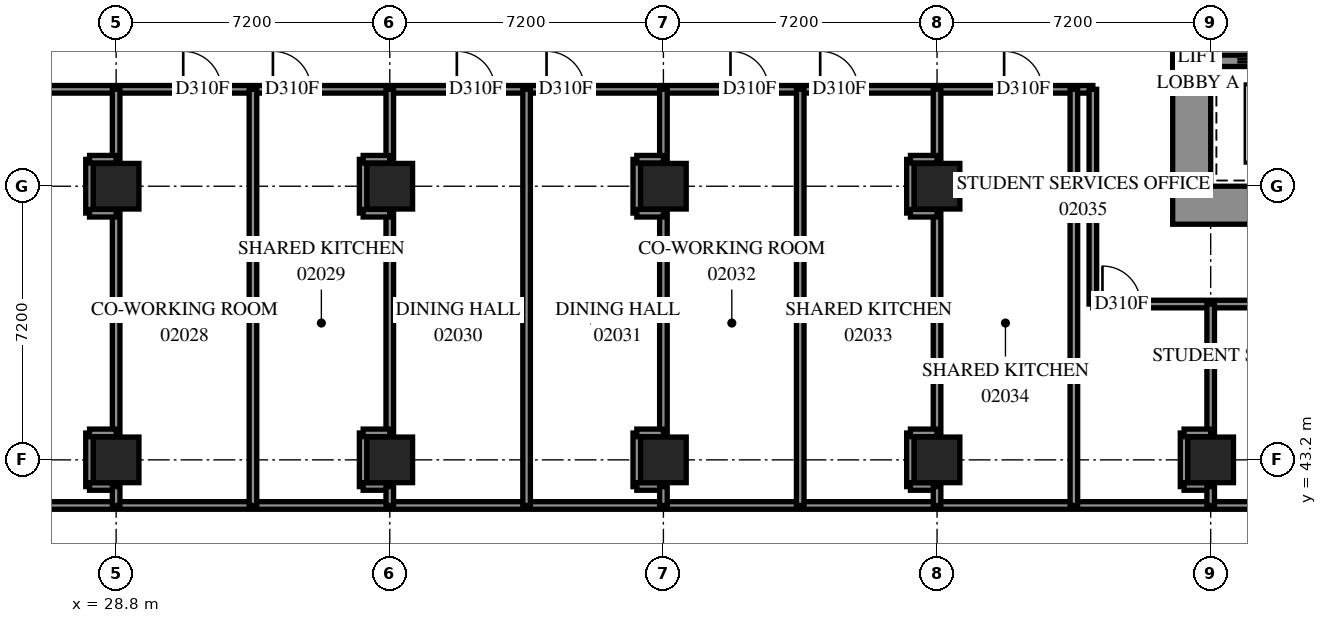
"""IFC4 building model, lengths in metres.
Left out: names, types, materials, properties, quantities, classifications, styles, units other than length and angle.
Written with IfcOpenShell. Run it as: python <this file> out.ifc"""

import sys

from ifc_helpers import new_model, si_unit, direction, frame, frame_2d, origin, origin_2d, place, context, subcontext, project, spatial, rectangle, extrude, element, fill, save


model = new_model("IFC4")
c1 = context("Model", 3, precision=1e-05, world=origin(), true_north=direction((0.0, 1.0)))
c2 = subcontext(c1, "Body", "Model", "MODEL_VIEW")
j1 = project(units=[si_unit("LENGTHUNIT", "METRE"), si_unit("PLANEANGLEUNIT", "RADIAN")], contexts=[c1])
p1 = place(None, origin())
s1 = spatial("IfcSite", under=j1, at=p1, CompositionType="ELEMENT")
p2 = place(p1, origin())
s2 = spatial("IfcBuilding", under=s1, at=p2, CompositionType="ELEMENT")
p3 = place(p2, frame((0.0, 0.0, 10.2)))
s3 = spatial("IfcBuildingStorey", under=s2, at=p3, CompositionType="ELEMENT", Elevation=10.2)
for number, where, z_axis, x_axis in (
    (1, (28.8, 43.2, 0.0), (0.0, 0.0, 1.0), (1.0, 0.0, 0.0)),
    (2, (28.8, 50.4, 0.0), (0.0, 0.0, 1.0), (1.0, 0.0, 0.0)),
    (3, (36.0, 43.2, 0.0), (0.0, 0.0, 1.0), (1.0, 0.0, 0.0)),
    (4, (36.0, 50.4, 0.0), (0.0, 0.0, 1.0), (1.0, 0.0, 0.0)),
    (5, (43.2, 43.2, 0.0), (0.0, 0.0, 1.0), (1.0, 0.0, 0.0)),
    (6, (43.2, 50.4, 0.0), (0.0, 0.0, 1.0), (1.0, 0.0, 0.0)),
    (7, (50.4, 43.2, 0.0), (0.0, 0.0, 1.0), (1.0, 0.0, 0.0)),
    (8, (50.4, 50.4, 0.0), (0.0, 0.0, 1.0), (1.0, 0.0, 0.0)),
    (9, (57.6, 43.2, 0.0), (0.0, 0.0, 1.0), (1.0, 0.0, 0.0)),
):
    element("IfcColumn", number, at=place(p3, frame(where, z_axis=z_axis, x_axis=x_axis)), inside=s3, PredefinedType="COLUMN", context=c2, shape_type="SweptSolid", body=[
        extrude(rectangle(XDim=1.2, YDim=1.2, at=origin_2d()), origin(), (0.0, 0.0, 1.0), 3.8),
    ])
p4 = place(p3, frame((56.6, 49.9, -0.4), z_axis=(0.0, 0.0, 1.0), x_axis=(1.0, 0.0, 0.0)))
e10 = element("IfcWall", 10, at=p4, inside=s3, PredefinedType="SHEAR", context=c2, shape_type="SweptSolid", body=[
    extrude(rectangle(XDim=16.4, YDim=1.0, at=frame_2d((8.2, 0.0))), origin(), (0.0, 0.0, 1.0), 3.5),
])
p5 = place(p3, frame((57.1, 50.4, -0.4), z_axis=(0.0, 0.0, 1.0), x_axis=(0.0, 1.0, 0.0)))
e11 = element("IfcWall", 11, at=p5, inside=s3, PredefinedType="SHEAR", context=c2, shape_type="SweptSolid", body=[
    extrude(rectangle(XDim=14.4, YDim=1.0, at=frame_2d((7.2, 0.0))), origin(), (0.0, 0.0, 1.0), 3.5),
])
p6 = place(p5, frame((4.55, 0.0, 0.4)))
e12 = element("IfcOpeningElement", 12, at=p6, cuts=e11, PredefinedType="OPENING", context=c2, shape_type="SweptSolid", body=[
    extrude(rectangle(XDim=1.1, YDim=2.1, at=frame_2d((0.55, 1.05))), frame((0.0, 0.51, 0.0), z_axis=(0.0, -1.0, 0.0), x_axis=(1.0, 0.0, 0.0)), (0.0, 0.0, 1.0), 1.02),
])
p7 = place(p5, frame((11.35, 0.0, 0.4)))
e13 = element("IfcOpeningElement", 13, at=p7, cuts=e11, PredefinedType="OPENING", context=c2, shape_type="SweptSolid", body=[
    extrude(rectangle(XDim=1.1, YDim=2.1, at=frame_2d((0.55, 1.05))), frame((0.0, 0.51, 0.0), z_axis=(0.0, -1.0, 0.0), x_axis=(1.0, 0.0, 0.0)), (0.0, 0.0, 1.0), 1.02),
])
p8 = place(p3, frame((57.6, 53.7, 0.0), z_axis=(0.0, 0.0, 1.0), x_axis=(1.0, 0.0, 0.0)))
e14 = element("IfcWall", 14, at=p8, inside=s3, PredefinedType="SOLIDWALL", context=c2, shape_type="SweptSolid", body=[
    extrude(rectangle(XDim=14.4, YDim=0.3, at=frame_2d((7.2, 0.0))), origin(), (0.0, 0.0, 1.0), 3.8),
])
p9 = place(p8, frame((1.25, 0.0, 0.0)))
e15 = element("IfcOpeningElement", 15, at=p9, cuts=e14, PredefinedType="OPENING", context=c2, shape_type="SweptSolid", body=[
    extrude(rectangle(XDim=1.1, YDim=2.1, at=frame_2d((0.55, 1.05))), frame((0.0, 0.16, 0.0), z_axis=(0.0, -1.0, 0.0), x_axis=(1.0, 0.0, 0.0)), (0.0, 0.0, 1.0), 0.32),
])
p10 = place(p8, frame((4.85, 0.0, 0.0)))
e16 = element("IfcOpeningElement", 16, at=p10, cuts=e14, PredefinedType="OPENING", context=c2, shape_type="SweptSolid", body=[
    extrude(rectangle(XDim=1.1, YDim=2.1, at=frame_2d((0.55, 1.05))), frame((0.0, 0.16, 0.0), z_axis=(0.0, -1.0, 0.0), x_axis=(1.0, 0.0, 0.0)), (0.0, 0.0, 1.0), 0.32),
])
p11 = place(p8, frame((8.45, 0.0, 0.0)))
e17 = element("IfcOpeningElement", 17, at=p11, cuts=e14, PredefinedType="OPENING", context=c2, shape_type="SweptSolid", body=[
    extrude(rectangle(XDim=1.1, YDim=2.1, at=frame_2d((0.55, 1.05))), frame((0.0, 0.16, 0.0), z_axis=(0.0, -1.0, 0.0), x_axis=(1.0, 0.0, 0.0)), (0.0, 0.0, 1.0), 0.32),
])
p12 = place(p8, frame((12.05, 0.0, 0.0)))
e18 = element("IfcOpeningElement", 18, at=p12, cuts=e14, PredefinedType="OPENING", context=c2, shape_type="SweptSolid", body=[
    extrude(rectangle(XDim=1.1, YDim=2.1, at=frame_2d((0.55, 1.05))), frame((0.0, 0.16, 0.0), z_axis=(0.0, -1.0, 0.0), x_axis=(1.0, 0.0, 0.0)), (0.0, 0.0, 1.0), 0.32),
])
p13 = place(p3, frame((13.75, 42.0, 0.0), z_axis=(0.0, 0.0, 1.0), x_axis=(1.0, 0.0, 0.0)))
e19 = element("IfcWall", 19, at=p13, inside=s3, PredefinedType="PARTITIONING", context=c2, shape_type="SweptSolid", body=[
    extrude(rectangle(XDim=58.9, YDim=0.2, at=frame_2d((29.45, 0.0))), origin(), (0.0, 0.0, 1.0), 3.8),
])
p14 = place(p3, frame((0.0, 52.95, 0.0), z_axis=(0.0, 0.0, 1.0), x_axis=(1.0, 0.0, 0.0)))
e20 = element("IfcWall", 20, at=p14, inside=s3, PredefinedType="PARTITIONING", context=c2, shape_type="SweptSolid", body=[
    extrude(rectangle(XDim=54.5, YDim=0.2, at=frame_2d((27.25, 0.0))), origin(), (0.0, 0.0, 1.0), 3.8),
])
p15 = place(p14, frame((8.669, 0.0, 0.0)))
e21 = element("IfcOpeningElement", 21, at=p15, cuts=e20, PredefinedType="OPENING", context=c2, shape_type="SweptSolid", body=[
    extrude(rectangle(XDim=1.0, YDim=2.1, at=frame_2d((0.5, 1.05))), frame((0.0, 0.11, 0.0), z_axis=(0.0, -1.0, 0.0), x_axis=(1.0, 0.0, 0.0)), (0.0, 0.0, 1.0), 0.22),
])
p16 = place(p14, frame((11.307, 0.0, 0.0)))
e22 = element("IfcOpeningElement", 22, at=p16, cuts=e20, PredefinedType="OPENING", context=c2, shape_type="SweptSolid", body=[
    extrude(rectangle(XDim=1.0, YDim=2.1, at=frame_2d((0.5, 1.05))), frame((0.0, 0.11, 0.0), z_axis=(0.0, -1.0, 0.0), x_axis=(1.0, 0.0, 0.0)), (0.0, 0.0, 1.0), 0.22),
])
p17 = place(p14, frame((16.433, 0.0, 0.0)))
e23 = element("IfcOpeningElement", 23, at=p17, cuts=e20, PredefinedType="OPENING", context=c2, shape_type="SweptSolid", body=[
    extrude(rectangle(XDim=1.0, YDim=2.1, at=frame_2d((0.5, 1.05))), frame((0.0, 0.11, 0.0), z_axis=(0.0, -1.0, 0.0), x_axis=(1.0, 0.0, 0.0)), (0.0, 0.0, 1.0), 0.22),
])
p18 = place(p14, frame((22.025, 0.0, 0.0)))
e24 = element("IfcOpeningElement", 24, at=p18, cuts=e20, PredefinedType="OPENING", context=c2, shape_type="SweptSolid", body=[
    extrude(rectangle(XDim=1.0, YDim=2.1, at=frame_2d((0.5, 1.05))), frame((0.0, 0.11, 0.0), z_axis=(0.0, -1.0, 0.0), x_axis=(1.0, 0.0, 0.0)), (0.0, 0.0, 1.0), 0.22),
])
p19 = place(p14, frame((30.565, 0.0, 0.0)))
e25 = element("IfcOpeningElement", 25, at=p19, cuts=e20, PredefinedType="OPENING", context=c2, shape_type="SweptSolid", body=[
    extrude(rectangle(XDim=1.0, YDim=2.1, at=frame_2d((0.5, 1.05))), frame((0.0, 0.11, 0.0), z_axis=(0.0, -1.0, 0.0), x_axis=(1.0, 0.0, 0.0)), (0.0, 0.0, 1.0), 0.22),
])
p20 = place(p14, frame((32.925, 0.0, 0.0)))
e26 = element("IfcOpeningElement", 26, at=p20, cuts=e20, PredefinedType="OPENING", context=c2, shape_type="SweptSolid", body=[
    extrude(rectangle(XDim=1.0, YDim=2.1, at=frame_2d((0.5, 1.05))), frame((0.0, 0.11, 0.0), z_axis=(0.0, -1.0, 0.0), x_axis=(1.0, 0.0, 0.0)), (0.0, 0.0, 1.0), 0.22),
])
p21 = place(p14, frame((37.765, 0.0, 0.0)))
e27 = element("IfcOpeningElement", 27, at=p21, cuts=e20, PredefinedType="OPENING", context=c2, shape_type="SweptSolid", body=[
    extrude(rectangle(XDim=1.0, YDim=2.1, at=frame_2d((0.5, 1.05))), frame((0.0, 0.11, 0.0), z_axis=(0.0, -1.0, 0.0), x_axis=(1.0, 0.0, 0.0)), (0.0, 0.0, 1.0), 0.22),
])
p22 = place(p14, frame((40.125, 0.0, 0.0)))
e28 = element("IfcOpeningElement", 28, at=p22, cuts=e20, PredefinedType="OPENING", context=c2, shape_type="SweptSolid", body=[
    extrude(rectangle(XDim=1.0, YDim=2.1, at=frame_2d((0.5, 1.05))), frame((0.0, 0.11, 0.0), z_axis=(0.0, -1.0, 0.0), x_axis=(1.0, 0.0, 0.0)), (0.0, 0.0, 1.0), 0.22),
])
p23 = place(p14, frame((44.965, 0.0, 0.0)))
e29 = element("IfcOpeningElement", 29, at=p23, cuts=e20, PredefinedType="OPENING", context=c2, shape_type="SweptSolid", body=[
    extrude(rectangle(XDim=1.0, YDim=2.1, at=frame_2d((0.5, 1.05))), frame((0.0, 0.11, 0.0), z_axis=(0.0, -1.0, 0.0), x_axis=(1.0, 0.0, 0.0)), (0.0, 0.0, 1.0), 0.22),
])
p24 = place(p14, frame((47.325, 0.0, 0.0)))
e30 = element("IfcOpeningElement", 30, at=p24, cuts=e20, PredefinedType="OPENING", context=c2, shape_type="SweptSolid", body=[
    extrude(rectangle(XDim=1.0, YDim=2.1, at=frame_2d((0.5, 1.05))), frame((0.0, 0.11, 0.0), z_axis=(0.0, -1.0, 0.0), x_axis=(1.0, 0.0, 0.0)), (0.0, 0.0, 1.0), 0.22),
])
p25 = place(p14, frame((52.165, 0.0, 0.0)))
e31 = element("IfcOpeningElement", 31, at=p25, cuts=e20, PredefinedType="OPENING", context=c2, shape_type="SweptSolid", body=[
    extrude(rectangle(XDim=1.0, YDim=2.1, at=frame_2d((0.5, 1.05))), frame((0.0, 0.11, 0.0), z_axis=(0.0, -1.0, 0.0), x_axis=(1.0, 0.0, 0.0)), (0.0, 0.0, 1.0), 0.22),
])
p26 = place(p14, frame((2.372, 0.0, 0.0)))
e32 = element("IfcOpeningElement", 32, at=p26, cuts=e20, PredefinedType="OPENING", context=c2, shape_type="SweptSolid", body=[
    extrude(rectangle(XDim=1.0, YDim=2.1, at=frame_2d((0.5, 1.05))), frame((0.0, 0.11, 0.0), z_axis=(0.0, -1.0, 0.0), x_axis=(1.0, 0.0, 0.0)), (0.0, 0.0, 1.0), 0.22),
])
p27 = place(p14, frame((4.792, 0.0, 0.0)))
e33 = element("IfcOpeningElement", 33, at=p27, cuts=e20, PredefinedType="OPENING", context=c2, shape_type="SweptSolid", body=[
    extrude(rectangle(XDim=1.0, YDim=2.1, at=frame_2d((0.5, 1.05))), frame((0.0, 0.11, 0.0), z_axis=(0.0, -1.0, 0.0), x_axis=(1.0, 0.0, 0.0)), (0.0, 0.0, 1.0), 0.22),
])
p28 = place(p3, frame((54.5, 47.3, 0.0), z_axis=(0.0, 0.0, 1.0), x_axis=(1.0, 0.0, 0.0)))
e34 = element("IfcWall", 34, at=p28, inside=s3, PredefinedType="PARTITIONING", context=c2, shape_type="SweptSolid", body=[
    extrude(rectangle(XDim=19.56, YDim=0.2, at=frame_2d((9.78, 0.0))), origin(), (0.0, 0.0, 1.0), 3.8),
])
p29 = place(p28, frame((0.252, 0.0, 0.0)))
e35 = element("IfcOpeningElement", 35, at=p29, cuts=e34, PredefinedType="OPENING", context=c2, shape_type="SweptSolid", body=[
    extrude(rectangle(XDim=1.0, YDim=2.1, at=frame_2d((0.5, 1.05))), frame((0.0, 0.11, 0.0), z_axis=(0.0, -1.0, 0.0), x_axis=(1.0, 0.0, 0.0)), (0.0, 0.0, 1.0), 0.22),
])
p30 = place(p28, frame((4.865, 0.0, 0.0)))
e36 = element("IfcOpeningElement", 36, at=p30, cuts=e34, PredefinedType="OPENING", context=c2, shape_type="SweptSolid", body=[
    extrude(rectangle(XDim=1.0, YDim=2.1, at=frame_2d((0.5, 1.05))), frame((0.0, 0.11, 0.0), z_axis=(0.0, -1.0, 0.0), x_axis=(1.0, 0.0, 0.0)), (0.0, 0.0, 1.0), 0.22),
])
p31 = place(p28, frame((7.225, 0.0, 0.0)))
e37 = element("IfcOpeningElement", 37, at=p31, cuts=e34, PredefinedType="OPENING", context=c2, shape_type="SweptSolid", body=[
    extrude(rectangle(XDim=1.0, YDim=2.1, at=frame_2d((0.5, 1.05))), frame((0.0, 0.11, 0.0), z_axis=(0.0, -1.0, 0.0), x_axis=(1.0, 0.0, 0.0)), (0.0, 0.0, 1.0), 0.22),
])
p32 = place(p28, frame((12.065, 0.0, 0.0)))
e38 = element("IfcOpeningElement", 38, at=p32, cuts=e34, PredefinedType="OPENING", context=c2, shape_type="SweptSolid", body=[
    extrude(rectangle(XDim=1.0, YDim=2.1, at=frame_2d((0.5, 1.05))), frame((0.0, 0.11, 0.0), z_axis=(0.0, -1.0, 0.0), x_axis=(1.0, 0.0, 0.0)), (0.0, 0.0, 1.0), 0.22),
])
p33 = place(p28, frame((14.425, 0.0, 0.0)))
e39 = element("IfcOpeningElement", 39, at=p33, cuts=e34, PredefinedType="OPENING", context=c2, shape_type="SweptSolid", body=[
    extrude(rectangle(XDim=1.0, YDim=2.1, at=frame_2d((0.5, 1.05))), frame((0.0, 0.11, 0.0), z_axis=(0.0, -1.0, 0.0), x_axis=(1.0, 0.0, 0.0)), (0.0, 0.0, 1.0), 0.22),
])
for number, where, z_axis, x_axis in (
    (40, (32.4, 42.0, 0.0), (0.0, 0.0, 1.0), (0.0, 1.0, 0.0)),
    (41, (39.6, 42.0, 0.0), (0.0, 0.0, 1.0), (0.0, 1.0, 0.0)),
    (42, (46.8, 42.0, 0.0), (0.0, 0.0, 1.0), (0.0, 1.0, 0.0)),
    (43, (54.0, 42.0, 0.0), (0.0, 0.0, 1.0), (0.0, 1.0, 0.0)),
):
    element("IfcWall", number, at=place(p3, frame(where, z_axis=z_axis, x_axis=x_axis)), inside=s3, PredefinedType="PARTITIONING", context=c2, shape_type="SweptSolid", body=[
        extrude(rectangle(XDim=10.95, YDim=0.2, at=frame_2d((5.475, 0.0))), origin(), (0.0, 0.0, 1.0), 3.8),
    ])
for number, where, z_axis, x_axis in (
    (44, (28.8, 43.906, 0.0), (0.0, 0.0, 1.0), (0.0, 1.0, 0.0)),
    (45, (36.0, 43.906, 0.0), (0.0, 0.0, 1.0), (0.0, 1.0, 0.0)),
    (46, (43.2, 43.906, 0.0), (0.0, 0.0, 1.0), (0.0, 1.0, 0.0)),
    (47, (50.4, 43.906, 0.0), (0.0, 0.0, 1.0), (0.0, 1.0, 0.0)),
):
    element("IfcWall", number, at=place(p3, frame(where, z_axis=z_axis, x_axis=x_axis)), inside=s3, PredefinedType="PARTITIONING", context=c2, shape_type="SweptSolid", body=[
        extrude(rectangle(XDim=5.788, YDim=0.2, at=frame_2d((2.894, 0.0))), origin(), (0.0, 0.0, 1.0), 3.8),
    ])
p34 = place(p3, frame((54.5, 47.3, 0.0), z_axis=(0.0, 0.0, 1.0), x_axis=(0.0, 1.0, 0.0)))
e48 = element("IfcWall", 48, at=p34, inside=s3, PredefinedType="PARTITIONING", context=c2, shape_type="SweptSolid", body=[
    extrude(rectangle(XDim=5.65, YDim=0.2, at=frame_2d((2.825, 0.0))), origin(), (0.0, 0.0, 1.0), 3.8),
])
p35 = place(p3, frame((57.6, 43.906, 0.0), z_axis=(0.0, 0.0, 1.0), x_axis=(0.0, 1.0, 0.0)))
e49 = element("IfcWall", 49, at=p35, inside=s3, PredefinedType="PARTITIONING", context=c2, shape_type="SweptSolid", body=[
    extrude(rectangle(XDim=3.394, YDim=0.2, at=frame_2d((1.697, 0.0))), origin(), (0.0, 0.0, 1.0), 3.8),
])
for number, where, z_axis, x_axis in (
    (50, (28.8, 51.106, 0.0), (0.0, 0.0, 1.0), (0.0, 1.0, 0.0)),
    (51, (36.0, 51.106, 0.0), (0.0, 0.0, 1.0), (0.0, 1.0, 0.0)),
    (52, (43.2, 51.106, 0.0), (0.0, 0.0, 1.0), (0.0, 1.0, 0.0)),
    (53, (50.4, 51.106, 0.0), (0.0, 0.0, 1.0), (0.0, 1.0, 0.0)),
):
    element("IfcWall", number, at=place(p3, frame(where, z_axis=z_axis, x_axis=x_axis)), inside=s3, PredefinedType="PARTITIONING", context=c2, shape_type="SweptSolid", body=[
        extrude(rectangle(XDim=1.844, YDim=0.2, at=frame_2d((0.922, 0.0))), origin(), (0.0, 0.0, 1.0), 3.8),
    ])
for number, where, z_axis, x_axis in (
    (54, (28.1, 49.694, 0.0), (0.0, 0.0, 1.0), (0.0, 1.0, 0.0)),
    (55, (35.3, 49.694, 0.0), (0.0, 0.0, 1.0), (0.0, 1.0, 0.0)),
    (56, (42.5, 49.694, 0.0), (0.0, 0.0, 1.0), (0.0, 1.0, 0.0)),
    (57, (49.7, 49.694, 0.0), (0.0, 0.0, 1.0), (0.0, 1.0, 0.0)),
):
    element("IfcWall", number, at=place(p3, frame(where, z_axis=z_axis, x_axis=x_axis)), inside=s3, PredefinedType="PARTITIONING", context=c2, shape_type="SweptSolid", body=[
        extrude(rectangle(XDim=1.412, YDim=0.2, at=frame_2d((0.706, 0.0))), origin(), (0.0, 0.0, 1.0), 3.8),
    ])
for number, where, z_axis, x_axis in (
    (58, (28.1, 42.496, 0.0), (0.0, 0.0, 1.0), (0.0, 1.0, 0.0)),
    (59, (35.3, 42.496, 0.0), (0.0, 0.0, 1.0), (0.0, 1.0, 0.0)),
    (60, (42.5, 42.496, 0.0), (0.0, 0.0, 1.0), (0.0, 1.0, 0.0)),
    (61, (49.7, 42.496, 0.0), (0.0, 0.0, 1.0), (0.0, 1.0, 0.0)),
    (62, (56.9, 42.496, 0.0), (0.0, 0.0, 1.0), (0.0, 1.0, 0.0)),
):
    element("IfcWall", number, at=place(p3, frame(where, z_axis=z_axis, x_axis=x_axis)), inside=s3, PredefinedType="PARTITIONING", context=c2, shape_type="SweptSolid", body=[
        extrude(rectangle(XDim=1.41, YDim=0.2, at=frame_2d((0.705, 0.0))), origin(), (0.0, 0.0, 1.0), 3.8),
    ])
for number, where, z_axis, x_axis in (
    (63, (35.3, 51.11, 0.0), (0.0, 0.0, 1.0), (1.0, 0.0, 0.0)),
    (64, (42.5, 51.11, 0.0), (0.0, 0.0, 1.0), (1.0, 0.0, 0.0)),
    (65, (35.3, 49.69, 0.0), (0.0, 0.0, 1.0), (1.0, 0.0, 0.0)),
    (66, (42.5, 49.69, 0.0), (0.0, 0.0, 1.0), (1.0, 0.0, 0.0)),
    (67, (35.3, 43.91, 0.0), (0.0, 0.0, 1.0), (1.0, 0.0, 0.0)),
    (68, (42.5, 43.91, 0.0), (0.0, 0.0, 1.0), (1.0, 0.0, 0.0)),
    (69, (56.9, 43.91, 0.0), (0.0, 0.0, 1.0), (1.0, 0.0, 0.0)),
    (70, (35.3, 42.5, 0.0), (0.0, 0.0, 1.0), (1.0, 0.0, 0.0)),
    (71, (42.5, 42.5, 0.0), (0.0, 0.0, 1.0), (1.0, 0.0, 0.0)),
    (72, (56.9, 42.5, 0.0), (0.0, 0.0, 1.0), (1.0, 0.0, 0.0)),
    (73, (28.1, 51.11, 0.0), (0.0, 0.0, 1.0), (1.0, 0.0, 0.0)),
    (74, (28.1, 49.69, 0.0), (0.0, 0.0, 1.0), (1.0, 0.0, 0.0)),
    (75, (28.1, 43.91, 0.0), (0.0, 0.0, 1.0), (1.0, 0.0, 0.0)),
    (76, (28.1, 42.5, 0.0), (0.0, 0.0, 1.0), (1.0, 0.0, 0.0)),
    (77, (49.7, 51.11, 0.0), (0.0, 0.0, 1.0), (1.0, 0.0, 0.0)),
    (78, (49.7, 49.69, 0.0), (0.0, 0.0, 1.0), (1.0, 0.0, 0.0)),
    (79, (49.7, 43.91, 0.0), (0.0, 0.0, 1.0), (1.0, 0.0, 0.0)),
    (80, (49.7, 42.5, 0.0), (0.0, 0.0, 1.0), (1.0, 0.0, 0.0)),
):
    element("IfcWall", number, at=place(p3, frame(where, z_axis=z_axis, x_axis=x_axis)), inside=s3, PredefinedType="PARTITIONING", context=c2, shape_type="SweptSolid", body=[
        extrude(rectangle(XDim=0.7, YDim=0.2, at=frame_2d((0.35, 0.0))), origin(), (0.0, 0.0, 1.0), 3.8),
    ])
for number, where, z_axis, x_axis in (
    (81, (28.8, 42.0, 0.0), (0.0, 0.0, 1.0), (0.0, 1.0, 0.0)),
    (82, (36.0, 42.0, 0.0), (0.0, 0.0, 1.0), (0.0, 1.0, 0.0)),
    (83, (43.2, 42.0, 0.0), (0.0, 0.0, 1.0), (0.0, 1.0, 0.0)),
    (84, (50.4, 42.0, 0.0), (0.0, 0.0, 1.0), (0.0, 1.0, 0.0)),
    (85, (57.6, 42.0, 0.0), (0.0, 0.0, 1.0), (0.0, 1.0, 0.0)),
):
    element("IfcWall", number, at=place(p3, frame(where, z_axis=z_axis, x_axis=x_axis)), inside=s3, PredefinedType="PARTITIONING", context=c2, shape_type="SweptSolid", body=[
        extrude(rectangle(XDim=0.496, YDim=0.2, at=frame_2d((0.248, 0.0))), origin(), (0.0, 0.0, 1.0), 3.8),
    ])
p36 = place(p19, origin())
e86 = element("IfcDoor", 86, at=p36, inside=s3, OperationType="SINGLE_SWING_LEFT", PredefinedType="DOOR", context=c2, shape_type="SweptSolid", body=[
    extrude(rectangle(XDim=1.0, YDim=2.1, at=frame_2d((0.5, 1.05))), frame((0.0, 0.025, 0.0), z_axis=(0.0, -1.0, 0.0), x_axis=(1.0, 0.0, 0.0)), (0.0, 0.0, 1.0), 0.05),
])
fill(e25, e86)
p37 = place(p20, origin())
e87 = element("IfcDoor", 87, at=p37, inside=s3, OperationType="SINGLE_SWING_RIGHT", PredefinedType="DOOR", context=c2, shape_type="SweptSolid", body=[
    extrude(rectangle(XDim=1.0, YDim=2.1, at=frame_2d((0.5, 1.05))), frame((0.0, 0.025, 0.0), z_axis=(0.0, -1.0, 0.0), x_axis=(1.0, 0.0, 0.0)), (0.0, 0.0, 1.0), 0.05),
])
fill(e26, e87)
p38 = place(p21, origin())
e88 = element("IfcDoor", 88, at=p38, inside=s3, OperationType="SINGLE_SWING_LEFT", PredefinedType="DOOR", context=c2, shape_type="SweptSolid", body=[
    extrude(rectangle(XDim=1.0, YDim=2.1, at=frame_2d((0.5, 1.05))), frame((0.0, 0.025, 0.0), z_axis=(0.0, -1.0, 0.0), x_axis=(1.0, 0.0, 0.0)), (0.0, 0.0, 1.0), 0.05),
])
fill(e27, e88)
p39 = place(p22, origin())
e89 = element("IfcDoor", 89, at=p39, inside=s3, OperationType="SINGLE_SWING_RIGHT", PredefinedType="DOOR", context=c2, shape_type="SweptSolid", body=[
    extrude(rectangle(XDim=1.0, YDim=2.1, at=frame_2d((0.5, 1.05))), frame((0.0, 0.025, 0.0), z_axis=(0.0, -1.0, 0.0), x_axis=(1.0, 0.0, 0.0)), (0.0, 0.0, 1.0), 0.05),
])
fill(e28, e89)
p40 = place(p23, origin())
e90 = element("IfcDoor", 90, at=p40, inside=s3, OperationType="SINGLE_SWING_LEFT", PredefinedType="DOOR", context=c2, shape_type="SweptSolid", body=[
    extrude(rectangle(XDim=1.0, YDim=2.1, at=frame_2d((0.5, 1.05))), frame((0.0, 0.025, 0.0), z_axis=(0.0, -1.0, 0.0), x_axis=(1.0, 0.0, 0.0)), (0.0, 0.0, 1.0), 0.05),
])
fill(e29, e90)
p41 = place(p24, origin())
e91 = element("IfcDoor", 91, at=p41, inside=s3, OperationType="SINGLE_SWING_RIGHT", PredefinedType="DOOR", context=c2, shape_type="SweptSolid", body=[
    extrude(rectangle(XDim=1.0, YDim=2.1, at=frame_2d((0.5, 1.05))), frame((0.0, 0.025, 0.0), z_axis=(0.0, -1.0, 0.0), x_axis=(1.0, 0.0, 0.0)), (0.0, 0.0, 1.0), 0.05),
])
fill(e30, e91)
p42 = place(p25, origin())
e92 = element("IfcDoor", 92, at=p42, inside=s3, OperationType="SINGLE_SWING_LEFT", PredefinedType="DOOR", context=c2, shape_type="SweptSolid", body=[
    extrude(rectangle(XDim=1.0, YDim=2.1, at=frame_2d((0.5, 1.05))), frame((0.0, 0.025, 0.0), z_axis=(0.0, -1.0, 0.0), x_axis=(1.0, 0.0, 0.0)), (0.0, 0.0, 1.0), 0.05),
])
fill(e31, e92)
p43 = place(p29, origin())
e93 = element("IfcDoor", 93, at=p43, inside=s3, OperationType="SINGLE_SWING_RIGHT", PredefinedType="DOOR", context=c2, shape_type="SweptSolid", body=[
    extrude(rectangle(XDim=1.0, YDim=2.1, at=frame_2d((0.5, 1.05))), frame((0.0, 0.025, 0.0), z_axis=(0.0, -1.0, 0.0), x_axis=(1.0, 0.0, 0.0)), (0.0, 0.0, 1.0), 0.05),
])
fill(e35, e93)
save(model, sys.argv[1])
